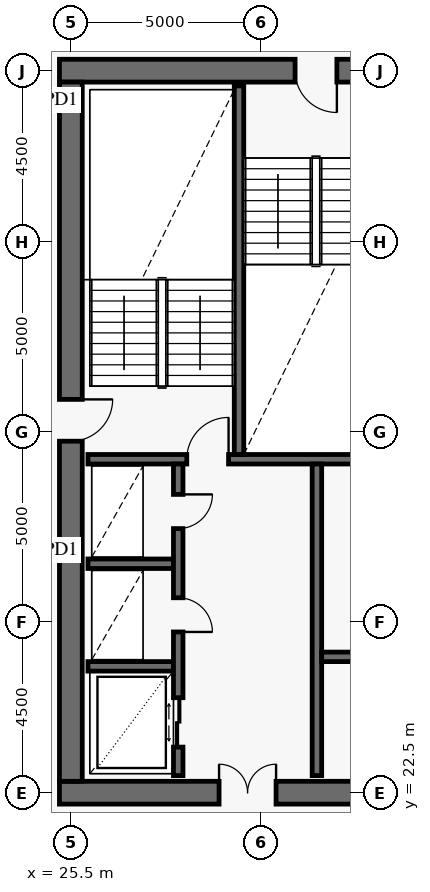
"""IFC4 building model, lengths in metres.
Left out: names, types, materials, properties, quantities, classifications, styles, units other than length and angle.
Written with IfcOpenShell. Run it as: python <this file> out.ifc"""

import sys

from ifc_helpers import new_model, si_unit, direction, frame, frame_2d, origin, place, context, subcontext, project, spatial, rectangle, extrude, element, fill, save


model = new_model("IFC4")
c1 = context("Model", 3, precision=1e-05, world=origin(), true_north=direction((0.0, 1.0)))
c2 = subcontext(c1, "Body", "Model", "MODEL_VIEW")
j1 = project(units=[si_unit("LENGTHUNIT", "METRE"), si_unit("PLANEANGLEUNIT", "RADIAN")], contexts=[c1])
p1 = place(None, origin())
s1 = spatial("IfcSite", under=j1, at=p1, CompositionType="ELEMENT")
p2 = place(p1, origin())
s2 = spatial("IfcBuilding", under=s1, at=p2, CompositionType="ELEMENT")
p3 = place(p2, frame((0.0, 0.0, 231.2)))
s3 = spatial("IfcBuildingStorey", under=s2, at=p3, CompositionType="ELEMENT", Elevation=231.2)
p4 = place(p3, frame((25.2, 22.5, 0.0), z_axis=(0.0, 0.0, 1.0), x_axis=(1.0, 0.0, 0.0)))
e1 = element("IfcWall", 1, at=p4, inside=s3, PredefinedType="SHEAR", context=c2, shape_type="SweptSolid", body=[
    extrude(rectangle(XDim=9.85, YDim=0.6, at=frame_2d((4.925, 0.0))), origin(), (0.0, 0.0, 1.0), 3.8),
])
p5 = place(p4, frame((4.2, 0.0, 0.0)))
e2 = element("IfcOpeningElement", 2, at=p5, cuts=e1, PredefinedType="OPENING", context=c2, shape_type="SweptSolid", body=[
    extrude(rectangle(XDim=1.5, YDim=2.15, at=frame_2d((0.75, 1.075))), frame((0.0, 0.312, 0.0), z_axis=(0.0, -1.0, 0.0), x_axis=(1.0, 0.0, 0.0)), (0.0, 0.0, 1.0), 0.624),
])
p6 = place(p3, frame((36.75, 41.5, 0.0), z_axis=(0.0, 0.0, 1.0), x_axis=(-1.0, 0.0, 0.0)))
e3 = element("IfcWall", 3, at=p6, inside=s3, PredefinedType="SHEAR", context=c2, shape_type="SweptSolid", body=[
    extrude(rectangle(XDim=11.55, YDim=0.6, at=frame_2d((5.775, 0.0))), origin(), (0.0, 0.0, 1.0), 3.8),
])
p7 = place(p6, frame((4.25, 0.0, 0.0)))
e4 = element("IfcOpeningElement", 4, at=p7, cuts=e3, PredefinedType="OPENING", context=c2, shape_type="SweptSolid", body=[
    extrude(rectangle(XDim=1.1, YDim=2.15, at=frame_2d((0.55, 1.075))), frame((0.0, 0.312, 0.0), z_axis=(0.0, -1.0, 0.0), x_axis=(1.0, 0.0, 0.0)), (0.0, 0.0, 1.0), 0.624),
])
p8 = place(p3, frame((25.5, 22.8, 0.0), z_axis=(0.0, 0.0, 1.0), x_axis=(0.0, 1.0, 0.0)))
e5 = element("IfcWall", 5, at=p8, inside=s3, PredefinedType="SHEAR", context=c2, shape_type="SweptSolid", body=[
    extrude(rectangle(XDim=18.4, YDim=0.6, at=frame_2d((9.2, 0.0))), origin(), (0.0, 0.0, 1.0), 3.8),
])
p9 = place(p8, frame((8.95, 0.0, 0.0)))
e6 = element("IfcOpeningElement", 6, at=p9, cuts=e5, PredefinedType="OPENING", context=c2, shape_type="SweptSolid", body=[
    extrude(rectangle(XDim=1.1, YDim=2.15, at=frame_2d((0.55, 1.075))), frame((0.0, 0.312, 0.0), z_axis=(0.0, -1.0, 0.0), x_axis=(1.0, 0.0, 0.0)), (0.0, 0.0, 1.0), 0.624),
])
p10 = place(p3, frame((25.95, 31.275, 0.0), z_axis=(0.0, 0.0, 1.0), x_axis=(1.0, 0.0, 0.0)))
e7 = element("IfcWall", 7, at=p10, inside=s3, PredefinedType="SOLIDWALL", context=c2, shape_type="SweptSolid", body=[
    extrude(rectangle(XDim=20.1, YDim=0.25, at=frame_2d((10.05, 0.0))), origin(), (0.0, 0.0, 1.0), 3.8),
])
p11 = place(p10, frame((2.6, 0.0, 0.0)))
e8 = element("IfcOpeningElement", 8, at=p11, cuts=e7, PredefinedType="OPENING", context=c2, shape_type="SweptSolid", body=[
    extrude(rectangle(XDim=1.1, YDim=2.15, at=frame_2d((0.55, 1.075))), frame((0.0, 0.137, 0.0), z_axis=(0.0, -1.0, 0.0), x_axis=(1.0, 0.0, 0.0)), (0.0, 0.0, 1.0), 0.274),
])
p12 = place(p10, frame((10.6, 0.0, 0.0)))
e9 = element("IfcOpeningElement", 9, at=p12, cuts=e7, PredefinedType="OPENING", context=c2, shape_type="SweptSolid", body=[
    extrude(rectangle(XDim=1.1, YDim=2.15, at=frame_2d((0.55, 1.075))), frame((0.0, 0.137, 0.0), z_axis=(0.0, -1.0, 0.0), x_axis=(1.0, 0.0, 0.0)), (0.0, 0.0, 1.0), 0.274),
])
p13 = place(p10, frame((16.35, 0.0, 0.0)))
e10 = element("IfcOpeningElement", 10, at=p13, cuts=e7, PredefinedType="OPENING", context=c2, shape_type="SweptSolid", body=[
    extrude(rectangle(XDim=1.1, YDim=2.15, at=frame_2d((0.55, 1.075))), frame((0.0, 0.137, 0.0), z_axis=(0.0, -1.0, 0.0), x_axis=(1.0, 0.0, 0.0)), (0.0, 0.0, 1.0), 0.274),
])
p14 = place(p3, frame((29.925, 31.4, 0.0), z_axis=(0.0, 0.0, 1.0), x_axis=(0.0, 1.0, 0.0)))
e11 = element("IfcWall", 11, at=p14, inside=s3, PredefinedType="SOLIDWALL", context=c2, shape_type="SweptSolid", body=[
    extrude(rectangle(XDim=9.7, YDim=0.25, at=frame_2d((4.85, 0.0))), origin(), (0.0, 0.0, 1.0), 3.8),
])
for number, where, z_axis, x_axis in (
    (12, (25.95, 25.825, 0.0), (0.0, 0.0, 1.0), (1.0, 0.0, 0.0)),
    (13, (25.95, 28.525, 0.0), (0.0, 0.0, 1.0), (1.0, 0.0, 0.0)),
):
    element("IfcWall", number, at=place(p3, frame(where, z_axis=z_axis, x_axis=x_axis)), inside=s3, PredefinedType="SOLIDWALL", context=c2, shape_type="SweptSolid", body=[
        extrude(rectangle(XDim=2.25, YDim=0.25, at=frame_2d((1.125, 0.0))), origin(), (0.0, 0.0, 1.0), 3.8),
    ])
p15 = place(p3, frame((28.325, 22.95, 0.0), z_axis=(0.0, 0.0, 1.0), x_axis=(0.0, 1.0, 0.0)))
e14 = element("IfcWall", 14, at=p15, inside=s3, PredefinedType="SOLIDWALL", context=c2, shape_type="SweptSolid", body=[
    extrude(rectangle(XDim=8.2, YDim=0.25, at=frame_2d((4.1, 0.0))), origin(), (0.0, 0.0, 1.0), 3.8),
])
p16 = place(p15, frame((0.75, 0.0, 0.0)))
e15 = element("IfcOpeningElement", 15, at=p16, cuts=e14, PredefinedType="OPENING", context=c2, shape_type="SweptSolid", body=[
    extrude(rectangle(XDim=1.3, YDim=2.3, at=frame_2d((0.65, 1.15))), frame((0.0, 0.137, 0.0), z_axis=(0.0, -1.0, 0.0), x_axis=(1.0, 0.0, 0.0)), (0.0, 0.0, 1.0), 0.274),
])
p17 = place(p15, frame((3.78, 0.0, 0.0)))
e16 = element("IfcOpeningElement", 16, at=p17, cuts=e14, PredefinedType="OPENING", context=c2, shape_type="SweptSolid", body=[
    extrude(rectangle(XDim=0.9, YDim=2.1, at=frame_2d((0.45, 1.05))), frame((0.0, 0.137, 0.0), z_axis=(0.0, -1.0, 0.0), x_axis=(1.0, 0.0, 0.0)), (0.0, 0.0, 1.0), 0.274),
])
p18 = place(p15, frame((6.5, 0.0, 0.0)))
e17 = element("IfcOpeningElement", 17, at=p18, cuts=e14, PredefinedType="OPENING", context=c2, shape_type="SweptSolid", body=[
    extrude(rectangle(XDim=0.9, YDim=2.1, at=frame_2d((0.45, 1.05))), frame((0.0, 0.137, 0.0), z_axis=(0.0, -1.0, 0.0), x_axis=(1.0, 0.0, 0.0)), (0.0, 0.0, 1.0), 0.274),
])
p19 = place(p3, frame((31.975, 22.95, 0.0), z_axis=(0.0, 0.0, 1.0), x_axis=(0.0, 1.0, 0.0)))
e18 = element("IfcWall", 18, at=p19, inside=s3, PredefinedType="SOLIDWALL", context=c2, shape_type="SweptSolid", body=[
    extrude(rectangle(XDim=8.2, YDim=0.25, at=frame_2d((4.1, 0.0))), origin(), (0.0, 0.0, 1.0), 3.8),
])
p20 = place(p3, frame((32.1, 26.075, 0.0), z_axis=(0.0, 0.0, 1.0), x_axis=(1.0, 0.0, 0.0)))
e19 = element("IfcWall", 19, at=p20, inside=s3, PredefinedType="SOLIDWALL", context=c2, shape_type="SweptSolid", body=[
    extrude(rectangle(XDim=2.3, YDim=0.25, at=frame_2d((1.15, 0.0))), origin(), (0.0, 0.0, 1.0), 3.8),
])
p21 = place(p9, frame((1.1, 0.0, 0.0), z_axis=(0.0, 0.0, 1.0), x_axis=(-1.0, 0.0, 0.0)))
e20 = element("IfcDoor", 20, at=p21, inside=s3, OperationType="SINGLE_SWING_LEFT", PredefinedType="USERDEFINED", context=c2, shape_type="SweptSolid", body=[
    extrude(rectangle(XDim=1.1, YDim=2.15, at=frame_2d((0.55, 1.075))), frame((0.0, 0.025, 0.0), z_axis=(0.0, -1.0, 0.0), x_axis=(1.0, 0.0, 0.0)), (0.0, 0.0, 1.0), 0.05),
])
fill(e6, e20)
p22 = place(p7, origin())
e21 = element("IfcDoor", 21, at=p22, inside=s3, OperationType="SINGLE_SWING_LEFT", PredefinedType="USERDEFINED", context=c2, shape_type="SweptSolid", body=[
    extrude(rectangle(XDim=1.1, YDim=2.15, at=frame_2d((0.55, 1.075))), frame((0.0, 0.025, 0.0), z_axis=(0.0, -1.0, 0.0), x_axis=(1.0, 0.0, 0.0)), (0.0, 0.0, 1.0), 0.05),
])
fill(e4, e21)
p23 = place(p5, origin())
e22 = element("IfcDoor", 22, at=p23, inside=s3, OperationType="DOUBLE_DOOR_SINGLE_SWING", PredefinedType="DOOR", context=c2, shape_type="SweptSolid", body=[
    extrude(rectangle(XDim=1.5, YDim=2.15, at=frame_2d((0.75, 1.075))), frame((0.0, 0.025, 0.0), z_axis=(0.0, -1.0, 0.0), x_axis=(1.0, 0.0, 0.0)), (0.0, 0.0, 1.0), 0.05),
])
fill(e2, e22)
p24 = place(p11, origin())
e23 = element("IfcDoor", 23, at=p24, inside=s3, OperationType="SINGLE_SWING_RIGHT", PredefinedType="USERDEFINED", context=c2, shape_type="SweptSolid", body=[
    extrude(rectangle(XDim=1.1, YDim=2.15, at=frame_2d((0.55, 1.075))), frame((0.0, 0.025, 0.0), z_axis=(0.0, -1.0, 0.0), x_axis=(1.0, 0.0, 0.0)), (0.0, 0.0, 1.0), 0.05),
])
fill(e8, e23)
p25 = place(p16, frame((1.3, 0.0, 0.0), z_axis=(0.0, 0.0, 1.0), x_axis=(-1.0, 0.0, 0.0)))
e24 = element("IfcDoor", 24, at=p25, inside=s3, OperationType="DOUBLE_DOOR_SLIDING", PredefinedType="DOOR", context=c2, shape_type="SweptSolid", body=[
    extrude(rectangle(XDim=1.3, YDim=2.3, at=frame_2d((0.65, 1.15))), frame((0.0, 0.025, 0.0), z_axis=(0.0, -1.0, 0.0), x_axis=(1.0, 0.0, 0.0)), (0.0, 0.0, 1.0), 0.05),
])
fill(e15, e24)
p26 = place(p17, frame((0.9, 0.0, 0.0), z_axis=(0.0, 0.0, 1.0), x_axis=(-1.0, 0.0, 0.0)))
e25 = element("IfcDoor", 25, at=p26, inside=s3, OperationType="SINGLE_SWING_RIGHT", PredefinedType="DOOR", context=c2, shape_type="SweptSolid", body=[
    extrude(rectangle(XDim=0.9, YDim=2.1, at=frame_2d((0.45, 1.05))), frame((0.0, 0.025, 0.0), z_axis=(0.0, -1.0, 0.0), x_axis=(1.0, 0.0, 0.0)), (0.0, 0.0, 1.0), 0.05),
])
fill(e16, e25)
p27 = place(p18, frame((0.9, 0.0, 0.0), z_axis=(0.0, 0.0, 1.0), x_axis=(-1.0, 0.0, 0.0)))
e26 = element("IfcDoor", 26, at=p27, inside=s3, OperationType="SINGLE_SWING_LEFT", PredefinedType="DOOR", context=c2, shape_type="SweptSolid", body=[
    extrude(rectangle(XDim=0.9, YDim=2.1, at=frame_2d((0.45, 1.05))), frame((0.0, 0.025, 0.0), z_axis=(0.0, -1.0, 0.0), x_axis=(1.0, 0.0, 0.0)), (0.0, 0.0, 1.0), 0.05),
])
fill(e17, e26)
save(model, sys.argv[1])
